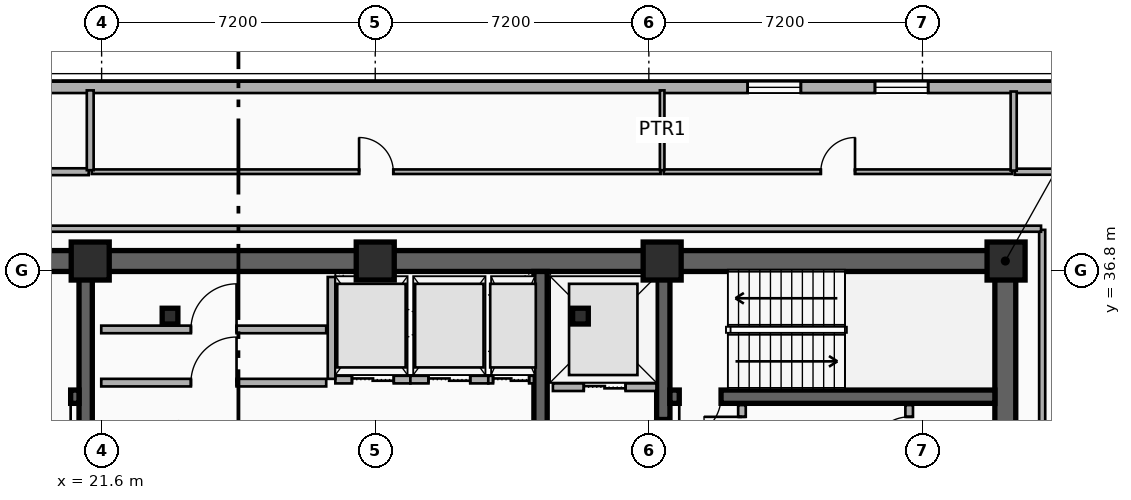
"""IFC4 building model, lengths in metres.
Left out: names, types, materials, properties, quantities, classifications, styles, units other than length and angle.
Written with IfcOpenShell. Run it as: python <this file> out.ifc"""

import sys

from ifc_helpers import new_model, si_unit, direction, frame, frame_2d, origin, origin_2d, place, context, subcontext, project, spatial, rectangle, i_section, extrude, element, fill, save


model = new_model("IFC4")
c1 = context("Model", 3, precision=1e-05, world=origin(), true_north=direction((0.0, 1.0)))
c2 = subcontext(c1, "Body", "Model", "MODEL_VIEW")
j1 = project(units=[si_unit("LENGTHUNIT", "METRE"), si_unit("PLANEANGLEUNIT", "RADIAN")], contexts=[c1])
p1 = place(None, origin())
s1 = spatial("IfcSite", under=j1, at=p1, CompositionType="ELEMENT")
p2 = place(p1, origin())
s2 = spatial("IfcBuilding", under=s1, at=p2, CompositionType="ELEMENT")
p3 = place(p2, frame((0.0, 0.0, 183.85)))
s3 = spatial("IfcBuildingStorey", under=s2, at=p3, CompositionType="ELEMENT", Elevation=183.85)
p4 = place(p3, frame((12.15, 37.05, 0.0), z_axis=(0.0, 0.0, 1.0), x_axis=(1.0, 0.0, 0.0)))
e1 = element("IfcWall", 1, at=p4, inside=s3, PredefinedType="SHEAR", context=c2, shape_type="SweptSolid", body=[
    extrude(rectangle(XDim=33.23, YDim=0.55, at=frame_2d((16.615, 0.0))), origin(), (0.0, 0.0, 1.0), 4.55),
])
p5 = place(p3, frame((45.38, 28.095, 0.0), z_axis=(0.0, 0.0, 1.0), x_axis=(0.0, 1.0, 0.0)))
e2 = element("IfcWall", 2, at=p5, inside=s3, PredefinedType="SHEAR", context=c2, shape_type="SweptSolid", body=[
    extrude(rectangle(XDim=8.68, YDim=0.55, at=frame_2d((4.34, 0.0))), origin(), (0.0, 0.0, 1.0), 4.55),
])
for number, where, z_axis, x_axis in (
    (3, (21.18, 28.095, 0.0), (0.0, 0.0, 1.0), (0.0, 1.0, 0.0)),
    (4, (33.15, 28.095, 0.0), (0.0, 0.0, 1.0), (0.0, 1.0, 0.0)),
):
    element("IfcWall", number, at=place(p3, frame(where, z_axis=z_axis, x_axis=x_axis)), inside=s3, PredefinedType="SHEAR", context=c2, shape_type="SweptSolid", body=[
        extrude(rectangle(XDim=8.68, YDim=0.35, at=frame_2d((4.34, 0.0))), origin(), (0.0, 0.0, 1.0), 4.55),
    ])
p6 = place(p3, frame((36.38, 28.095, 0.0), z_axis=(0.0, 0.0, 1.0), x_axis=(0.0, 1.0, 0.0)))
e5 = element("IfcWall", 5, at=p6, inside=s3, PredefinedType="SHEAR", context=c2, shape_type="SweptSolid", body=[
    extrude(rectangle(XDim=8.68, YDim=0.35, at=frame_2d((4.34, 0.0))), origin(), (0.0, 0.0, 1.0), 4.55),
])
p7 = place(p6, frame((3.685, 0.0, 0.0)))
e6 = element("IfcOpeningElement", 6, at=p7, cuts=e5, PredefinedType="OPENING", context=c2, shape_type="SweptSolid", body=[
    extrude(rectangle(XDim=1.1, YDim=2.15, at=frame_2d((0.55, 1.075))), frame((0.0, 0.185, 0.0), z_axis=(0.0, -1.0, 0.0), x_axis=(1.0, 0.0, 0.0)), (0.0, 0.0, 1.0), 0.37),
])
p8 = place(p3, frame((21.005, 33.48, 0.0), z_axis=(0.0, 0.0, 1.0), x_axis=(-1.0, 0.0, 0.0)))
e7 = element("IfcWall", 7, at=p8, inside=s3, PredefinedType="SHEAR", context=c2, shape_type="SweptSolid", body=[
    extrude(rectangle(XDim=8.58, YDim=0.35, at=frame_2d((4.29, 0.0))), origin(), (0.0, 0.0, 1.0), 4.55),
])
p9 = place(p8, frame((0.22, 0.0, 0.0)))
e8 = element("IfcOpeningElement", 8, at=p9, cuts=e7, PredefinedType="OPENING", context=c2, shape_type="SweptSolid", body=[
    extrude(rectangle(XDim=1.1, YDim=2.15, at=frame_2d((0.55, 1.075))), frame((0.0, 0.185, 0.0), z_axis=(0.0, -1.0, 0.0), x_axis=(1.0, 0.0, 0.0)), (0.0, 0.0, 1.0), 0.37),
])
p10 = place(p3, frame((45.105, 33.48, 0.0), z_axis=(0.0, 0.0, 1.0), x_axis=(-1.0, 0.0, 0.0)))
e9 = element("IfcWall", 9, at=p10, inside=s3, PredefinedType="SHEAR", context=c2, shape_type="SweptSolid", body=[
    extrude(rectangle(XDim=8.55, YDim=0.35, at=frame_2d((4.275, 0.0))), origin(), (0.0, 0.0, 1.0), 4.55),
])
p11 = place(p10, frame((7.205, 0.0, 0.0)))
e10 = element("IfcOpeningElement", 10, at=p11, cuts=e9, PredefinedType="OPENING", context=c2, shape_type="SweptSolid", body=[
    extrude(rectangle(XDim=1.1, YDim=2.15, at=frame_2d((0.55, 1.075))), frame((0.0, 0.185, 0.0), z_axis=(0.0, -1.0, 0.0), x_axis=(1.0, 0.0, 0.0)), (0.0, 0.0, 1.0), 0.37),
])
for number, where, z_axis, x_axis in (
    (11, (34.2, 35.6, 0.0), (0.0, 0.0, 1.0), (1.0, 0.0, 0.0)),
    (12, (23.4, 35.6, 0.0), (0.0, 0.0, 1.0), (1.0, 0.0, 0.0)),
):
    element("IfcColumn", number, at=place(p3, frame(where, z_axis=z_axis, x_axis=x_axis)), inside=s3, PredefinedType="COLUMN", context=c2, shape_type="SweptSolid", body=[
        extrude(i_section(OverallWidth=0.413, OverallDepth=0.415, WebThickness=0.03, FlangeThickness=0.047, FilletRadius=0.015, at=origin_2d()), origin(), (0.0, 0.0, 1.0), 4.55),
    ])
for number, where, z_axis, x_axis in (
    (13, (21.3, 37.05, 0.0), (0.0, 0.0, 1.0), (1.0, 0.0, 0.0)),
    (14, (28.8, 37.05, 0.0), (0.0, 0.0, 1.0), (1.0, 0.0, 0.0)),
    (15, (36.35, 37.05, 0.0), (0.0, 0.0, 1.0), (1.0, 0.0, 0.0)),
    (16, (45.4, 37.05, 0.0), (0.0, 0.0, 1.0), (1.0, 0.0, 0.0)),
):
    element("IfcColumn", number, at=place(p3, frame(where, z_axis=z_axis, x_axis=x_axis)), inside=s3, PredefinedType="COLUMN", context=c2, shape_type="SweptSolid", body=[
        extrude(rectangle(XDim=1.0, YDim=1.0, at=origin_2d()), origin(), (0.0, 0.0, 1.0), 4.55),
    ])
p12 = place(p3, frame((9.6, 41.62, 0.0), z_axis=(0.0, 0.0, 1.0), x_axis=(1.0, 0.0, 0.0)))
e17 = element("IfcWall", 17, at=p12, inside=s3, PredefinedType="SOLIDWALL", context=c2, shape_type="SweptSolid", body=[
    extrude(rectangle(XDim=38.4, YDim=0.3, at=frame_2d((19.2, 0.0))), origin(), (0.0, 0.0, 1.0), 4.23),
])
p13 = place(p12, frame((4.667, 0.0, 0.75)))
e18 = element("IfcOpeningElement", 18, at=p13, cuts=e17, PredefinedType="OPENING", context=c2, shape_type="SweptSolid", body=[
    extrude(rectangle(XDim=1.4, YDim=2.1, at=frame_2d((0.7, 1.05))), frame((0.0, 0.16, 0.0), z_axis=(0.0, -1.0, 0.0), x_axis=(1.0, 0.0, 0.0)), (0.0, 0.0, 1.0), 0.32),
])
p14 = place(p12, frame((8.033, 0.0, 0.75)))
e19 = element("IfcOpeningElement", 19, at=p14, cuts=e17, PredefinedType="OPENING", context=c2, shape_type="SweptSolid", body=[
    extrude(rectangle(XDim=1.4, YDim=2.1, at=frame_2d((0.7, 1.05))), frame((0.0, 0.16, 0.0), z_axis=(0.0, -1.0, 0.0), x_axis=(1.0, 0.0, 0.0)), (0.0, 0.0, 1.0), 0.32),
])
p15 = place(p12, frame((29.0, 0.0, 0.75)))
e20 = element("IfcOpeningElement", 20, at=p15, cuts=e17, PredefinedType="OPENING", context=c2, shape_type="SweptSolid", body=[
    extrude(rectangle(XDim=1.4, YDim=2.1, at=frame_2d((0.7, 1.05))), frame((0.0, 0.16, 0.0), z_axis=(0.0, -1.0, 0.0), x_axis=(1.0, 0.0, 0.0)), (0.0, 0.0, 1.0), 0.32),
])
p16 = place(p12, frame((32.35, 0.0, 0.75)))
e21 = element("IfcOpeningElement", 21, at=p16, cuts=e17, PredefinedType="OPENING", context=c2, shape_type="SweptSolid", body=[
    extrude(rectangle(XDim=1.4, YDim=2.1, at=frame_2d((0.7, 1.05))), frame((0.0, 0.16, 0.0), z_axis=(0.0, -1.0, 0.0), x_axis=(1.0, 0.0, 0.0)), (0.0, 0.0, 1.0), 0.32),
])
p17 = place(p3, frame((33.475, 33.73, 0.0), z_axis=(0.0, 0.0, 1.0), x_axis=(1.0, 0.0, 0.0)))
e22 = element("IfcWall", 22, at=p17, inside=s3, PredefinedType="PARTITIONING", context=c2, shape_type="SweptSolid", body=[
    extrude(rectangle(XDim=2.725, YDim=0.2, at=frame_2d((1.362, 0.0))), origin(), (0.0, 0.0, 1.0), 3.3),
])
p18 = place(p17, frame((0.812, 0.0, 0.0)))
e23 = element("IfcOpeningElement", 23, at=p18, cuts=e22, PredefinedType="OPENING", context=c2, shape_type="SweptSolid", body=[
    extrude(rectangle(XDim=1.1, YDim=2.15, at=frame_2d((0.55, 1.075))), frame((0.0, 0.11, 0.0), z_axis=(0.0, -1.0, 0.0), x_axis=(1.0, 0.0, 0.0)), (0.0, 0.0, 1.0), 0.22),
])
p19 = place(p3, frame((27.75, 33.93, 0.0), z_axis=(0.0, 0.0, 1.0), x_axis=(1.0, 0.0, 0.0)))
e24 = element("IfcWall", 24, at=p19, inside=s3, PredefinedType="PARTITIONING", context=c2, shape_type="SweptSolid", body=[
    extrude(rectangle(XDim=1.975, YDim=0.2, at=frame_2d((0.988, 0.0))), origin(), (0.0, 0.0, 1.0), 3.3),
])
p20 = place(p19, frame((0.438, 0.0, 0.0)))
e25 = element("IfcOpeningElement", 25, at=p20, cuts=e24, PredefinedType="OPENING", context=c2, shape_type="SweptSolid", body=[
    extrude(rectangle(XDim=1.1, YDim=2.15, at=frame_2d((0.55, 1.075))), frame((0.0, 0.11, 0.0), z_axis=(0.0, -1.0, 0.0), x_axis=(1.0, 0.0, 0.0)), (0.0, 0.0, 1.0), 0.22),
])
p21 = place(p3, frame((27.65, 33.95, 0.0), z_axis=(0.0, 0.0, 1.0), x_axis=(0.0, 1.0, 0.0)))
e26 = element("IfcWall", 26, at=p21, inside=s3, PredefinedType="PARTITIONING", context=c2, shape_type="SweptSolid", body=[
    extrude(rectangle(XDim=2.68, YDim=0.2, at=frame_2d((1.34, 0.0))), origin(), (0.0, 0.0, 1.0), 3.3),
])
p22 = place(p3, frame((29.725, 33.93, 0.0), z_axis=(0.0, 0.0, 1.0), x_axis=(1.0, 0.0, 0.0)))
e27 = element("IfcWall", 27, at=p22, inside=s3, PredefinedType="PARTITIONING", context=c2, shape_type="SweptSolid", body=[
    extrude(rectangle(XDim=2.05, YDim=0.2, at=frame_2d((1.025, 0.0))), origin(), (0.0, 0.0, 1.0), 4.23),
])
p23 = place(p22, frame((0.475, 0.0, 0.0)))
e28 = element("IfcOpeningElement", 28, at=p23, cuts=e27, PredefinedType="OPENING", context=c2, shape_type="SweptSolid", body=[
    extrude(rectangle(XDim=1.1, YDim=2.15, at=frame_2d((0.55, 1.075))), frame((0.0, 0.11, 0.0), z_axis=(0.0, -1.0, 0.0), x_axis=(1.0, 0.0, 0.0)), (0.0, 0.0, 1.0), 0.22),
])
p24 = place(p3, frame((31.775, 33.93, 0.0), z_axis=(0.0, 0.0, 1.0), x_axis=(1.0, 0.0, 0.0)))
e29 = element("IfcWall", 29, at=p24, inside=s3, PredefinedType="PARTITIONING", context=c2, shape_type="SweptSolid", body=[
    extrude(rectangle(XDim=1.2, YDim=0.2, at=frame_2d((0.6, 0.0))), origin(), (0.0, 0.0, 1.0), 4.23),
])
p25 = place(p24, frame((0.125, 0.0, 0.0)))
e30 = element("IfcOpeningElement", 30, at=p25, cuts=e29, PredefinedType="OPENING", context=c2, shape_type="SweptSolid", body=[
    extrude(rectangle(XDim=0.95, YDim=2.15, at=frame_2d((0.475, 1.075))), frame((0.0, 0.11, 0.0), z_axis=(0.0, -1.0, 0.0), x_axis=(1.0, 0.0, 0.0)), (0.0, 0.0, 1.0), 0.22),
])
p26 = place(p3, frame((38.45, 31.64, 0.0), z_axis=(0.0, 0.0, 1.0), x_axis=(0.0, 1.0, 0.0)))
e31 = element("IfcWall", 31, at=p26, inside=s3, PredefinedType="PARTITIONING", context=c2, shape_type="SweptSolid", body=[
    extrude(rectangle(XDim=1.62, YDim=0.2, at=frame_2d((0.81, 0.0))), origin(), (0.0, 0.0, 1.0), 4.23),
])
p27 = place(p26, frame((0.31, 0.0, 0.0)))
e32 = element("IfcOpeningElement", 32, at=p27, cuts=e31, PredefinedType="OPENING", context=c2, shape_type="SweptSolid", body=[
    extrude(rectangle(XDim=1.0, YDim=2.15, at=frame_2d((0.5, 1.075))), frame((0.0, 0.11, 0.0), z_axis=(0.0, -1.0, 0.0), x_axis=(1.0, 0.0, 0.0)), (0.0, 0.0, 1.0), 0.22),
])
p28 = place(p3, frame((42.85, 31.64, 0.0), z_axis=(0.0, 0.0, 1.0), x_axis=(0.0, 1.0, 0.0)))
e33 = element("IfcWall", 33, at=p28, inside=s3, PredefinedType="PARTITIONING", context=c2, shape_type="SweptSolid", body=[
    extrude(rectangle(XDim=1.62, YDim=0.2, at=frame_2d((0.81, 0.0))), origin(), (0.0, 0.0, 1.0), 4.23),
])
p29 = place(p28, frame((0.31, 0.0, 0.0)))
e34 = element("IfcOpeningElement", 34, at=p29, cuts=e33, PredefinedType="OPENING", context=c2, shape_type="SweptSolid", body=[
    extrude(rectangle(XDim=1.0, YDim=2.15, at=frame_2d((0.5, 1.075))), frame((0.0, 0.11, 0.0), z_axis=(0.0, -1.0, 0.0), x_axis=(1.0, 0.0, 0.0)), (0.0, 0.0, 1.0), 0.22),
])
p30 = place(p3, frame((21.59, 33.85, 0.0), z_axis=(0.0, 0.0, 1.0), x_axis=(1.0, 0.0, 0.0)))
e35 = element("IfcWall", 35, at=p30, inside=s3, PredefinedType="PARTITIONING", context=c2, shape_type="SweptSolid", body=[
    extrude(rectangle(XDim=5.92, YDim=0.2, at=frame_2d((2.96, 0.0))), origin(), (0.0, 0.0, 1.0), 3.3),
])
p31 = place(p30, frame((2.36, 0.0, 0.0)))
e36 = element("IfcOpeningElement", 36, at=p31, cuts=e35, PredefinedType="OPENING", context=c2, shape_type="SweptSolid", body=[
    extrude(rectangle(XDim=1.2, YDim=2.15, at=frame_2d((0.6, 1.075))), frame((0.0, 0.11, 0.0), z_axis=(0.0, -1.0, 0.0), x_axis=(1.0, 0.0, 0.0)), (0.0, 0.0, 1.0), 0.22),
])
p32 = place(p3, frame((21.59, 35.25, 0.0), z_axis=(0.0, 0.0, 1.0), x_axis=(1.0, 0.0, 0.0)))
e37 = element("IfcWall", 37, at=p32, inside=s3, PredefinedType="PARTITIONING", context=c2, shape_type="SweptSolid", body=[
    extrude(rectangle(XDim=5.92, YDim=0.2, at=frame_2d((2.96, 0.0))), origin(), (0.0, 0.0, 1.0), 3.3),
])
p33 = place(p32, frame((2.36, 0.0, 0.0)))
e38 = element("IfcOpeningElement", 38, at=p33, cuts=e37, PredefinedType="OPENING", context=c2, shape_type="SweptSolid", body=[
    extrude(rectangle(XDim=1.2, YDim=2.15, at=frame_2d((0.6, 1.075))), frame((0.0, 0.11, 0.0), z_axis=(0.0, -1.0, 0.0), x_axis=(1.0, 0.0, 0.0)), (0.0, 0.0, 1.0), 0.22),
])
p34 = place(p3, frame((12.04, 39.4, 0.0), z_axis=(0.0, 0.0, 1.0), x_axis=(1.0, 0.0, 0.0)))
e39 = element("IfcWall", 39, at=p34, inside=s3, PredefinedType="PLUMBINGWALL", context=c2, shape_type="SweptSolid", body=[
    extrude(rectangle(XDim=9.22, YDim=0.18, at=frame_2d((4.61, 0.0))), origin(), (0.0, 0.0, 1.0), 4.23),
])
p35 = place(p34, frame((4.11, 0.0, 0.0)))
e40 = element("IfcOpeningElement", 40, at=p35, cuts=e39, PredefinedType="OPENING", context=c2, shape_type="SweptSolid", body=[
    extrude(rectangle(XDim=1.0, YDim=2.15, at=frame_2d((0.5, 1.075))), frame((0.0, 0.1, 0.0), z_axis=(0.0, -1.0, 0.0), x_axis=(1.0, 0.0, 0.0)), (0.0, 0.0, 1.0), 0.2),
])
p36 = place(p3, frame((21.34, 39.4, 0.0), z_axis=(0.0, 0.0, 1.0), x_axis=(1.0, 0.0, 0.0)))
e41 = element("IfcWall", 41, at=p36, inside=s3, PredefinedType="PARTITIONING", context=c2, shape_type="SweptSolid", body=[
    extrude(rectangle(XDim=14.97, YDim=0.12, at=frame_2d((7.485, 0.0))), origin(), (0.0, 0.0, 1.0), 4.23),
])
p37 = place(p36, frame((7.035, 0.0, 0.0)))
e42 = element("IfcOpeningElement", 42, at=p37, cuts=e41, PredefinedType="OPENING", context=c2, shape_type="SweptSolid", body=[
    extrude(rectangle(XDim=0.9, YDim=2.1, at=frame_2d((0.45, 1.05))), frame((0.0, 0.07, 0.0), z_axis=(0.0, -1.0, 0.0), x_axis=(1.0, 0.0, 0.0)), (0.0, 0.0, 1.0), 0.14),
])
p38 = place(p3, frame((36.39, 39.4, 0.0), z_axis=(0.0, 0.0, 1.0), x_axis=(1.0, 0.0, 0.0)))
e43 = element("IfcWall", 43, at=p38, inside=s3, PredefinedType="PARTITIONING", context=c2, shape_type="SweptSolid", body=[
    extrude(rectangle(XDim=9.17, YDim=0.12, at=frame_2d((4.585, 0.0))), origin(), (0.0, 0.0, 1.0), 4.23),
])
p39 = place(p38, frame((4.135, 0.0, 0.0)))
e44 = element("IfcOpeningElement", 44, at=p39, cuts=e43, PredefinedType="OPENING", context=c2, shape_type="SweptSolid", body=[
    extrude(rectangle(XDim=0.9, YDim=2.1, at=frame_2d((0.45, 1.05))), frame((0.0, 0.07, 0.0), z_axis=(0.0, -1.0, 0.0), x_axis=(1.0, 0.0, 0.0)), (0.0, 0.0, 1.0), 0.14),
])
p40 = place(p3, frame((21.3, 39.44, 0.0), z_axis=(0.0, 0.0, 1.0), x_axis=(0.0, 1.0, 0.0)))
e45 = element("IfcWall", 45, at=p40, inside=s3, PredefinedType="PLUMBINGWALL", context=c2, shape_type="SweptSolid", body=[
    extrude(rectangle(XDim=2.1, YDim=0.18, at=frame_2d((1.05, 0.0))), origin(), (0.0, 0.0, 1.0), 4.23),
])
p41 = place(p3, frame((36.35, 39.44, 0.0), z_axis=(0.0, 0.0, 1.0), x_axis=(0.0, 1.0, 0.0)))
e46 = element("IfcWall", 46, at=p41, inside=s3, PredefinedType="PARTITIONING", context=c2, shape_type="SweptSolid", body=[
    extrude(rectangle(XDim=2.1, YDim=0.12, at=frame_2d((1.05, 0.0))), origin(), (0.0, 0.0, 1.0), 4.23),
])
p42 = place(p3, frame((46.35, 27.63, 0.0), z_axis=(0.0, 0.0, 1.0), x_axis=(0.0, 1.0, 0.0)))
e47 = element("IfcWall", 47, at=p42, inside=s3, PredefinedType="PARTITIONING", context=c2, shape_type="SweptSolid", body=[
    extrude(rectangle(XDim=10.24, YDim=0.16, at=frame_2d((5.12, 0.0))), origin(), (0.0, 0.0, 1.0), 3.71),
])
p43 = place(p3, frame((11.28, 37.9, 0.0), z_axis=(0.0, 0.0, 1.0), x_axis=(1.0, 0.0, 0.0)))
e48 = element("IfcWall", 48, at=p43, inside=s3, PredefinedType="PARTITIONING", context=c2, shape_type="SweptSolid", body=[
    extrude(rectangle(XDim=35.04, YDim=0.16, at=frame_2d((17.52, 0.0))), origin(), (0.0, 0.0, 1.0), 4.23),
])
p44 = place(p3, frame((45.63, 39.4, 0.0), z_axis=(0.0, 0.0, 1.0), x_axis=(1.0, 0.0, 0.0)))
e49 = element("IfcWall", 49, at=p44, inside=s3, PredefinedType="PARTITIONING", context=c2, shape_type="SweptSolid", body=[
    extrude(rectangle(XDim=2.39, YDim=0.16, at=frame_2d((1.195, 0.0))), origin(), (0.0, 0.0, 1.0), 4.23),
])
p45 = place(p3, frame((45.6, 39.43, 0.0), z_axis=(0.0, 0.0, 1.0), x_axis=(0.0, 1.0, 0.0)))
e50 = element("IfcWall", 50, at=p45, inside=s3, PredefinedType="PARTITIONING", context=c2, shape_type="SweptSolid", body=[
    extrude(rectangle(XDim=2.08, YDim=0.16, at=frame_2d((1.04, 0.0))), origin(), (0.0, 0.0, 1.0), 4.23),
])
p46 = place(p15, origin())
e51 = element("IfcWindow", 51, at=p46, inside=s3, PartitioningType="SINGLE_PANEL", PredefinedType="WINDOW", context=c2, shape_type="SweptSolid", body=[
    extrude(rectangle(XDim=1.4, YDim=2.1, at=frame_2d((0.7, 1.05))), frame((0.0, 0.03, 0.0), z_axis=(0.0, -1.0, 0.0), x_axis=(1.0, 0.0, 0.0)), (0.0, 0.0, 1.0), 0.06),
])
fill(e20, e51)
p47 = place(p16, origin())
e52 = element("IfcWindow", 52, at=p47, inside=s3, PartitioningType="SINGLE_PANEL", PredefinedType="WINDOW", context=c2, shape_type="SweptSolid", body=[
    extrude(rectangle(XDim=1.4, YDim=2.1, at=frame_2d((0.7, 1.05))), frame((0.0, 0.03, 0.0), z_axis=(0.0, -1.0, 0.0), x_axis=(1.0, 0.0, 0.0)), (0.0, 0.0, 1.0), 0.06),
])
fill(e21, e52)
p48 = place(p18, origin())
e53 = element("IfcDoor", 53, at=p48, inside=s3, OperationType="DOUBLE_DOOR_SLIDING", PredefinedType="DOOR", context=c2, shape_type="SweptSolid", body=[
    extrude(rectangle(XDim=1.1, YDim=2.15, at=frame_2d((0.55, 1.075))), frame((0.0, 0.025, 0.0), z_axis=(0.0, -1.0, 0.0), x_axis=(1.0, 0.0, 0.0)), (0.0, 0.0, 1.0), 0.05),
])
fill(e23, e53)
p49 = place(p20, origin())
e54 = element("IfcDoor", 54, at=p49, inside=s3, OperationType="DOUBLE_DOOR_SLIDING", PredefinedType="DOOR", context=c2, shape_type="SweptSolid", body=[
    extrude(rectangle(XDim=1.1, YDim=2.15, at=frame_2d((0.55, 1.075))), frame((0.0, 0.025, 0.0), z_axis=(0.0, -1.0, 0.0), x_axis=(1.0, 0.0, 0.0)), (0.0, 0.0, 1.0), 0.05),
])
fill(e25, e54)
p50 = place(p23, origin())
e55 = element("IfcDoor", 55, at=p50, inside=s3, OperationType="DOUBLE_DOOR_SLIDING", PredefinedType="DOOR", context=c2, shape_type="SweptSolid", body=[
    extrude(rectangle(XDim=1.1, YDim=2.15, at=frame_2d((0.55, 1.075))), frame((0.0, 0.025, 0.0), z_axis=(0.0, -1.0, 0.0), x_axis=(1.0, 0.0, 0.0)), (0.0, 0.0, 1.0), 0.05),
])
fill(e28, e55)
p51 = place(p25, origin())
e56 = element("IfcDoor", 56, at=p51, inside=s3, OperationType="DOUBLE_DOOR_SLIDING", PredefinedType="DOOR", context=c2, shape_type="SweptSolid", body=[
    extrude(rectangle(XDim=0.95, YDim=2.15, at=frame_2d((0.475, 1.075))), frame((0.0, 0.025, 0.0), z_axis=(0.0, -1.0, 0.0), x_axis=(1.0, 0.0, 0.0)), (0.0, 0.0, 1.0), 0.05),
])
fill(e30, e56)
p52 = place(p9, origin())
e57 = element("IfcDoor", 57, at=p52, inside=s3, OperationType="SINGLE_SWING_LEFT", PredefinedType="DOOR", context=c2, shape_type="SweptSolid", body=[
    extrude(rectangle(XDim=1.1, YDim=2.15, at=frame_2d((0.55, 1.075))), frame((0.0, 0.025, 0.0), z_axis=(0.0, -1.0, 0.0), x_axis=(1.0, 0.0, 0.0)), (0.0, 0.0, 1.0), 0.05),
])
fill(e8, e57)
p53 = place(p11, origin())
e58 = element("IfcDoor", 58, at=p53, inside=s3, OperationType="SINGLE_SWING_RIGHT", PredefinedType="DOOR", context=c2, shape_type="SweptSolid", body=[
    extrude(rectangle(XDim=1.1, YDim=2.15, at=frame_2d((0.55, 1.075))), frame((0.0, 0.025, 0.0), z_axis=(0.0, -1.0, 0.0), x_axis=(1.0, 0.0, 0.0)), (0.0, 0.0, 1.0), 0.05),
])
fill(e10, e58)
p54 = place(p7, origin())
e59 = element("IfcDoor", 59, at=p54, inside=s3, OperationType="SINGLE_SWING_LEFT", PredefinedType="DOOR", context=c2, shape_type="SweptSolid", body=[
    extrude(rectangle(XDim=1.1, YDim=2.15, at=frame_2d((0.55, 1.075))), frame((0.0, 0.025, 0.0), z_axis=(0.0, -1.0, 0.0), x_axis=(1.0, 0.0, 0.0)), (0.0, 0.0, 1.0), 0.05),
])
fill(e6, e59)
p55 = place(p27, origin())
e60 = element("IfcDoor", 60, at=p55, inside=s3, OperationType="SINGLE_SWING_RIGHT", PredefinedType="DOOR", context=c2, shape_type="SweptSolid", body=[
    extrude(rectangle(XDim=1.0, YDim=2.15, at=frame_2d((0.5, 1.075))), frame((0.0, 0.025, 0.0), z_axis=(0.0, -1.0, 0.0), x_axis=(1.0, 0.0, 0.0)), (0.0, 0.0, 1.0), 0.05),
])
fill(e32, e60)
p56 = place(p29, origin())
e61 = element("IfcDoor", 61, at=p56, inside=s3, OperationType="SINGLE_SWING_LEFT", PredefinedType="DOOR", context=c2, shape_type="SweptSolid", body=[
    extrude(rectangle(XDim=1.0, YDim=2.15, at=frame_2d((0.5, 1.075))), frame((0.0, 0.025, 0.0), z_axis=(0.0, -1.0, 0.0), x_axis=(1.0, 0.0, 0.0)), (0.0, 0.0, 1.0), 0.05),
])
fill(e34, e61)
p57 = place(p31, origin())
e62 = element("IfcDoor", 62, at=p57, inside=s3, OperationType="SINGLE_SWING_RIGHT", PredefinedType="DOOR", context=c2, shape_type="SweptSolid", body=[
    extrude(rectangle(XDim=1.2, YDim=2.15, at=frame_2d((0.6, 1.075))), frame((0.0, 0.025, 0.0), z_axis=(0.0, -1.0, 0.0), x_axis=(1.0, 0.0, 0.0)), (0.0, 0.0, 1.0), 0.05),
])
fill(e36, e62)
p58 = place(p33, origin())
e63 = element("IfcDoor", 63, at=p58, inside=s3, OperationType="SINGLE_SWING_RIGHT", PredefinedType="DOOR", context=c2, shape_type="SweptSolid", body=[
    extrude(rectangle(XDim=1.2, YDim=2.15, at=frame_2d((0.6, 1.075))), frame((0.0, 0.025, 0.0), z_axis=(0.0, -1.0, 0.0), x_axis=(1.0, 0.0, 0.0)), (0.0, 0.0, 1.0), 0.05),
])
fill(e38, e63)
p59 = place(p37, origin())
e64 = element("IfcDoor", 64, at=p59, inside=s3, OperationType="SINGLE_SWING_LEFT", PredefinedType="DOOR", context=c2, shape_type="SweptSolid", body=[
    extrude(rectangle(XDim=0.9, YDim=2.1, at=frame_2d((0.45, 1.05))), frame((0.0, 0.025, 0.0), z_axis=(0.0, -1.0, 0.0), x_axis=(1.0, 0.0, 0.0)), (0.0, 0.0, 1.0), 0.05),
])
fill(e42, e64)
p60 = place(p39, origin())
e65 = element("IfcDoor", 65, at=p60, inside=s3, OperationType="SINGLE_SWING_RIGHT", PredefinedType="DOOR", context=c2, shape_type="SweptSolid", body=[
    extrude(rectangle(XDim=0.9, YDim=2.1, at=frame_2d((0.45, 1.05))), frame((0.0, 0.025, 0.0), z_axis=(0.0, -1.0, 0.0), x_axis=(1.0, 0.0, 0.0)), (0.0, 0.0, 1.0), 0.05),
])
fill(e44, e65)
save(model, sys.argv[1])
